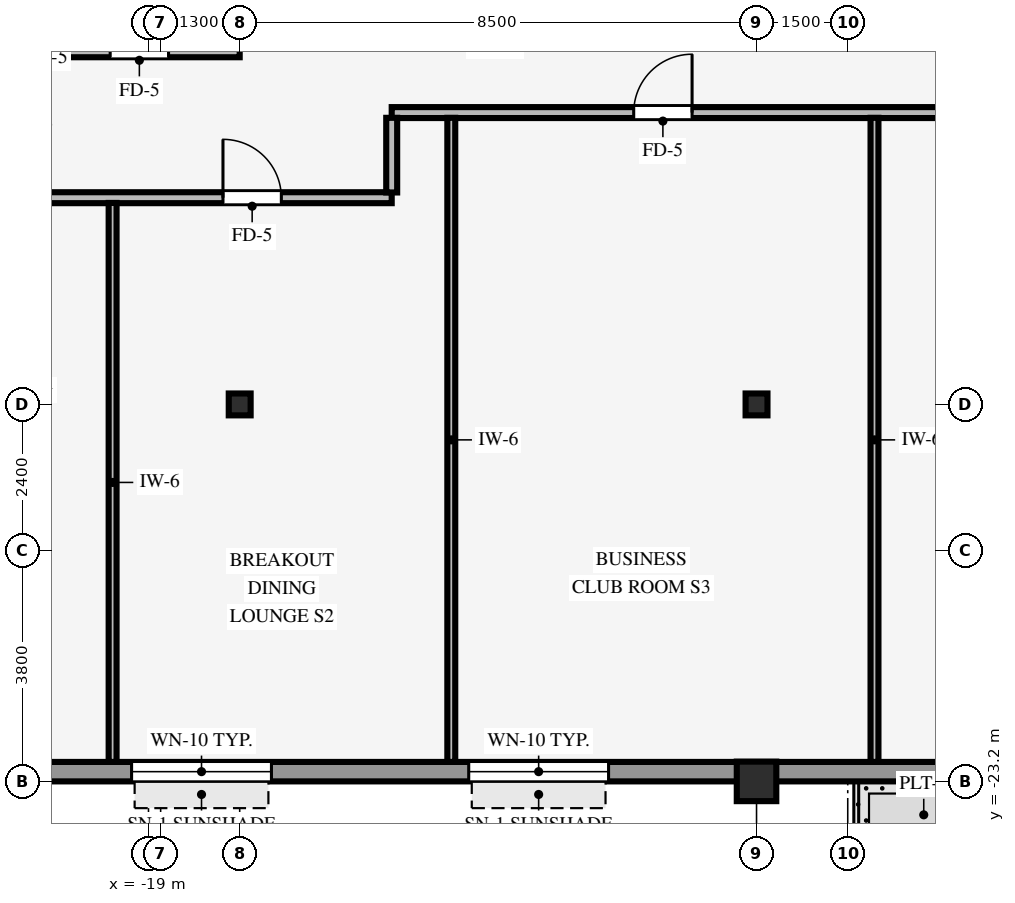
"""IFC4 building model, lengths in metres.
Left out: names, types, materials, properties, quantities, classifications, styles, units other than length and angle.
Written with IfcOpenShell. Run it as: python <this file> out.ifc"""

import sys

from ifc_helpers import new_model, si_unit, direction, frame, frame_2d, origin, origin_2d, place, context, subcontext, project, spatial, rectangle, hollow_rectangle, i_section, extrude, source, transform, mapped, element, fill, save


model = new_model("IFC4")
c1 = context("Model", 3, precision=1e-05, world=origin(), true_north=direction((0.0, 1.0)))
c2 = subcontext(c1, "Body", "Model", "MODEL_VIEW")
j1 = project(units=[si_unit("LENGTHUNIT", "METRE"), si_unit("PLANEANGLEUNIT", "RADIAN")], contexts=[c1])
p1 = place(None, origin())
s1 = spatial("IfcSite", under=j1, at=p1, CompositionType="ELEMENT")
p2 = place(p1, origin())
s2 = spatial("IfcBuilding", under=s1, at=p2, CompositionType="ELEMENT")
p3 = place(p2, frame((0.0, 0.0, 105.6)))
s3 = spatial("IfcBuildingStorey", under=s2, at=p3, CompositionType="ELEMENT", Elevation=105.6)
p4 = place(p3, frame((-9.0, -23.2, 0.0), z_axis=(0.0, 0.0, 1.0), x_axis=(1.0, 0.0, 0.0)))
e1 = element("IfcColumn", 1, at=p4, inside=s3, PredefinedType="COLUMN", context=c2, shape_type="SweptSolid", body=[
    extrude(hollow_rectangle(XDim=0.65, YDim=0.65, WallThickness=0.04, InnerFilletRadius=0.04, OuterFilletRadius=0.08, at=origin_2d()), origin(), (0.0, 0.0, 1.0), 3.37),
])
for number, where, z_axis, x_axis in (
    (2, (-17.5, -17.0, 0.0), (0.0, 0.0, 1.0), (1.0, 0.0, 0.0)),
    (3, (-9.0, -17.0, 0.0), (0.0, 0.0, 1.0), (1.0, 0.0, 0.0)),
):
    element("IfcColumn", number, at=place(p3, frame(where, z_axis=z_axis, x_axis=x_axis)), inside=s3, PredefinedType="COLUMN", context=c2, shape_type="SweptSolid", body=[
        extrude(i_section(OverallWidth=0.36, OverallDepth=0.36, WebThickness=0.021, FlangeThickness=0.021, FilletRadius=0.018, at=origin_2d()), origin(), (0.0, 0.0, 1.0), 3.37),
    ])
p5 = place(p3, frame((-21.9, -23.04, 0.0), z_axis=(0.0, 0.0, 1.0), x_axis=(1.0, 0.0, 0.0)))
e4 = element("IfcWall", 4, at=p5, inside=s3, PredefinedType="STANDARD", context=c2, shape_type="SweptSolid", body=[
    extrude(rectangle(XDim=43.8, YDim=0.32, at=frame_2d((21.9, 0.0))), origin(), (0.0, 0.0, 1.0), 2.705),
])
p6 = place(p5, frame((17.58, 0.0, 0.0), z_axis=(0.0, 0.0, 1.0), x_axis=(-1.0, 0.0, 0.0)))
e5 = element("IfcOpeningElement", 5, at=p6, cuts=e4, PredefinedType="OPENING", context=c2, shape_type="SweptSolid", body=[
    extrude(rectangle(XDim=0.98, YDim=2.15, at=frame_2d((0.49, 1.075))), frame((0.0, 0.17, 0.0), z_axis=(0.0, -1.0, 0.0), x_axis=(1.0, 0.0, 0.0)), (0.0, 0.0, 1.0), 0.34),
])
p7 = place(p5, frame((2.622, 0.0, 0.8)))
e6 = element("IfcOpeningElement", 6, at=p7, cuts=e4, PredefinedType="OPENING", context=c2, shape_type="SweptSolid", body=[
    extrude(rectangle(XDim=2.3, YDim=1.62, at=frame_2d((1.15, 0.81))), frame((0.0, 0.17, 0.0), z_axis=(0.0, -1.0, 0.0), x_axis=(1.0, 0.0, 0.0)), (0.0, 0.0, 1.0), 0.34),
])
p8 = place(p5, frame((8.167, 0.0, 0.8)))
e7 = element("IfcOpeningElement", 7, at=p8, cuts=e4, PredefinedType="OPENING", context=c2, shape_type="SweptSolid", body=[
    extrude(rectangle(XDim=2.3, YDim=1.62, at=frame_2d((1.15, 0.81))), frame((0.0, 0.17, 0.0), z_axis=(0.0, -1.0, 0.0), x_axis=(1.0, 0.0, 0.0)), (0.0, 0.0, 1.0), 0.34),
])
p9 = place(p5, frame((24.044, 0.0, 0.8)))
e8 = element("IfcOpeningElement", 8, at=p9, cuts=e4, PredefinedType="OPENING", context=c2, shape_type="SweptSolid", body=[
    extrude(rectangle(XDim=2.3, YDim=1.62, at=frame_2d((1.15, 0.81))), frame((0.0, 0.17, 0.0), z_axis=(0.0, -1.0, 0.0), x_axis=(1.0, 0.0, 0.0)), (0.0, 0.0, 1.0), 0.34),
])
p10 = place(p5, frame((34.233, 0.0, 0.8)))
e9 = element("IfcOpeningElement", 9, at=p10, cuts=e4, PredefinedType="OPENING", context=c2, shape_type="SweptSolid", body=[
    extrude(rectangle(XDim=2.3, YDim=1.62, at=frame_2d((1.15, 0.81))), frame((0.0, 0.17, 0.0), z_axis=(0.0, -1.0, 0.0), x_axis=(1.0, 0.0, 0.0)), (0.0, 0.0, 1.0), 0.34),
])
p11 = place(p5, frame((38.878, 0.0, 0.8)))
e10 = element("IfcOpeningElement", 10, at=p11, cuts=e4, PredefinedType="OPENING", context=c2, shape_type="SweptSolid", body=[
    extrude(rectangle(XDim=2.3, YDim=1.62, at=frame_2d((1.15, 0.81))), frame((0.0, 0.17, 0.0), z_axis=(0.0, -1.0, 0.0), x_axis=(1.0, 0.0, 0.0)), (0.0, 0.0, 1.0), 0.34),
])
p12 = place(p3, frame((-20.8, -13.6, 0.0), z_axis=(0.0, 0.0, 1.0), x_axis=(1.0, 0.0, 0.0)))
e11 = element("IfcWall", 11, at=p12, inside=s3, PredefinedType="PARTITIONING", context=c2, shape_type="SweptSolid", body=[
    extrude(rectangle(XDim=5.8, YDim=0.18, at=frame_2d((2.9, 0.0))), origin(), (0.0, 0.0, 1.0), 2.998),
])
p13 = place(p12, frame((3.025, 0.0, 0.0)))
e12 = element("IfcOpeningElement", 12, at=p13, cuts=e11, PredefinedType="OPENING", context=c2, shape_type="SweptSolid", body=[
    extrude(rectangle(XDim=0.96, YDim=2.1, at=frame_2d((0.48, 1.05))), frame((0.0, 0.1, 0.0), z_axis=(0.0, -1.0, 0.0), x_axis=(1.0, 0.0, 0.0)), (0.0, 0.0, 1.0), 0.2),
])
p14 = place(p3, frame((-15.0, -12.2, 0.0), z_axis=(0.0, 0.0, 1.0), x_axis=(1.0, 0.0, 0.0)))
e13 = element("IfcWall", 13, at=p14, inside=s3, PredefinedType="PARTITIONING", context=c2, shape_type="SweptSolid", body=[
    extrude(rectangle(XDim=30.0, YDim=0.18, at=frame_2d((15.0, 0.0))), origin(), (0.0, 0.0, 1.0), 3.36),
])
p15 = place(p14, frame((3.98, 0.0, 0.0)))
e14 = element("IfcOpeningElement", 14, at=p15, cuts=e13, PredefinedType="OPENING", context=c2, shape_type="SweptSolid", body=[
    extrude(rectangle(XDim=0.96, YDim=2.1, at=frame_2d((0.48, 1.05))), frame((0.0, 0.1, 0.0), z_axis=(0.0, -1.0, 0.0), x_axis=(1.0, 0.0, 0.0)), (0.0, 0.0, 1.0), 0.2),
])
p16 = place(p14, frame((16.695, 0.0, 0.0)))
e15 = element("IfcOpeningElement", 15, at=p16, cuts=e13, PredefinedType="OPENING", context=c2, shape_type="SweptSolid", body=[
    extrude(rectangle(XDim=0.96, YDim=2.1, at=frame_2d((0.48, 1.05))), frame((0.0, 0.1, 0.0), z_axis=(0.0, -1.0, 0.0), x_axis=(1.0, 0.0, 0.0)), (0.0, 0.0, 1.0), 0.2),
])
p17 = place(p14, frame((22.15, 0.0, 0.0)))
e16 = element("IfcOpeningElement", 16, at=p17, cuts=e13, PredefinedType="OPENING", context=c2, shape_type="SweptSolid", body=[
    extrude(rectangle(XDim=0.96, YDim=2.1, at=frame_2d((0.48, 1.05))), frame((0.0, 0.1, 0.0), z_axis=(0.0, -1.0, 0.0), x_axis=(1.0, 0.0, 0.0)), (0.0, 0.0, 1.0), 0.2),
])
p18 = place(p14, frame((27.075, 0.0, 0.0)))
e17 = element("IfcOpeningElement", 17, at=p18, cuts=e13, PredefinedType="OPENING", context=c2, shape_type="SweptSolid", body=[
    extrude(rectangle(XDim=0.96, YDim=2.1, at=frame_2d((0.48, 1.05))), frame((0.0, 0.1, 0.0), z_axis=(0.0, -1.0, 0.0), x_axis=(1.0, 0.0, 0.0)), (0.0, 0.0, 1.0), 0.2),
])
p19 = place(p14, frame((9.39, 0.0, 0.0)))
e18 = element("IfcOpeningElement", 18, at=p19, cuts=e13, PredefinedType="OPENING", context=c2, shape_type="SweptSolid", body=[
    extrude(rectangle(XDim=0.96, YDim=2.1, at=frame_2d((0.48, 1.05))), frame((0.0, 0.1, 0.0), z_axis=(0.0, -1.0, 0.0), x_axis=(1.0, 0.0, 0.0)), (0.0, 0.0, 1.0), 0.2),
])
p20 = place(p3, frame((-23.68, -11.2, 0.0), z_axis=(0.0, 0.0, 1.0), x_axis=(1.0, 0.0, 0.0)))
e19 = element("IfcWall", 19, at=p20, inside=s3, PredefinedType="PARTITIONING", context=c2, shape_type="SweptSolid", body=[
    extrude(rectangle(XDim=6.18, YDim=0.18, at=frame_2d((3.09, 0.0))), origin(), (0.0, 0.0, 1.0), 3.36),
])
p21 = place(p20, frame((4.05, 0.0, 0.0)))
e20 = element("IfcOpeningElement", 20, at=p21, cuts=e19, PredefinedType="OPENING", context=c2, shape_type="SweptSolid", body=[
    extrude(rectangle(XDim=0.96, YDim=2.1, at=frame_2d((0.48, 1.05))), frame((0.0, 0.1, 0.0), z_axis=(0.0, -1.0, 0.0), x_axis=(1.0, 0.0, 0.0)), (0.0, 0.0, 1.0), 0.2),
])
p22 = place(p3, frame((-19.59, -22.88, 0.0), z_axis=(0.0, 0.0, 1.0), x_axis=(0.0, 1.0, 0.0)))
e21 = element("IfcWall", 21, at=p22, inside=s3, PredefinedType="PARTITIONING", context=c2, shape_type="SweptSolid", body=[
    extrude(rectangle(XDim=9.194, YDim=0.13, at=frame_2d((4.597, 0.0))), origin(), (0.0, 0.0, 1.0), 3.36),
])
p23 = place(p3, frame((-15.0, -13.514, 0.0), z_axis=(0.0, 0.0, 1.0), x_axis=(0.0, 1.0, 0.0)))
e22 = element("IfcWall", 22, at=p23, inside=s3, PredefinedType="PARTITIONING", context=c2, shape_type="SweptSolid", body=[
    extrude(rectangle(XDim=1.228, YDim=0.18, at=frame_2d((0.614, 0.0))), origin(), (0.0, 0.0, 1.0), 3.36),
])
for number, where, z_axis, x_axis in (
    (23, (-14.02, -22.88, 0.0), (0.0, 0.0, 1.0), (0.0, 1.0, 0.0)),
    (24, (-7.06, -22.88, 0.0), (0.0, 0.0, 1.0), (0.0, 1.0, 0.0)),
):
    element("IfcWall", number, at=place(p3, frame(where, z_axis=z_axis, x_axis=x_axis)), inside=s3, PredefinedType="PARTITIONING", context=c2, shape_type="SweptSolid", body=[
        extrude(rectangle(XDim=10.594, YDim=0.13, at=frame_2d((5.297, 0.0))), origin(), (0.0, 0.0, 1.0), 3.36),
    ])
m1 = source(origin(), c2, "Body", "SweptSolid", [
    extrude(rectangle(XDim=2.3, YDim=1.62, at=frame_2d((1.15, 0.81))), frame((0.0, 0.03, 0.0), z_axis=(0.0, -1.0, 0.0), x_axis=(1.0, 0.0, 0.0)), (0.0, 0.0, 1.0), 0.06),
])
p24 = place(p7, origin())
e25 = element("IfcWindow", 25, at=p24, inside=s3, PartitioningType="SINGLE_PANEL", PredefinedType="WINDOW", context=c2, shape_type="MappedRepresentation", body=[
    mapped(m1, transform((0.0, 0.0, 0.0), scale=1.0)),
])
fill(e6, e25)
p25 = place(p8, origin())
e26 = element("IfcWindow", 26, at=p25, inside=s3, PartitioningType="SINGLE_PANEL", PredefinedType="WINDOW", context=c2, shape_type="MappedRepresentation", body=[
    mapped(m1, transform((0.0, 0.0, 0.0), scale=1.0)),
])
fill(e7, e26)
m2 = source(origin(), c2, "Body", "SweptSolid", [
    extrude(rectangle(XDim=0.96, YDim=2.1, at=frame_2d((0.48, 1.05))), frame((0.0, 0.025, 0.0), z_axis=(0.0, -1.0, 0.0), x_axis=(1.0, 0.0, 0.0)), (0.0, 0.0, 1.0), 0.05),
])
p26 = place(p15, origin())
e27 = element("IfcDoor", 27, at=p26, inside=s3, OperationType="SINGLE_SWING_RIGHT", PredefinedType="DOOR", context=c2, shape_type="MappedRepresentation", body=[
    mapped(m2, transform((0.0, 0.0, 0.0), scale=1.0)),
])
fill(e14, e27)
p27 = place(p13, origin())
e28 = element("IfcDoor", 28, at=p27, inside=s3, OperationType="SINGLE_SWING_LEFT", PredefinedType="DOOR", context=c2, shape_type="MappedRepresentation", body=[
    mapped(m2, transform((0.0, 0.0, 0.0), scale=1.0)),
])
fill(e12, e28)
p28 = place(p21, origin())
e29 = element("IfcDoor", 29, at=p28, inside=s3, OperationType="SINGLE_SWING_LEFT", PredefinedType="DOOR", context=c2, shape_type="MappedRepresentation", body=[
    mapped(m2, transform((0.0, 0.0, 0.0), scale=1.0)),
])
fill(e20, e29)
save(model, sys.argv[1])
